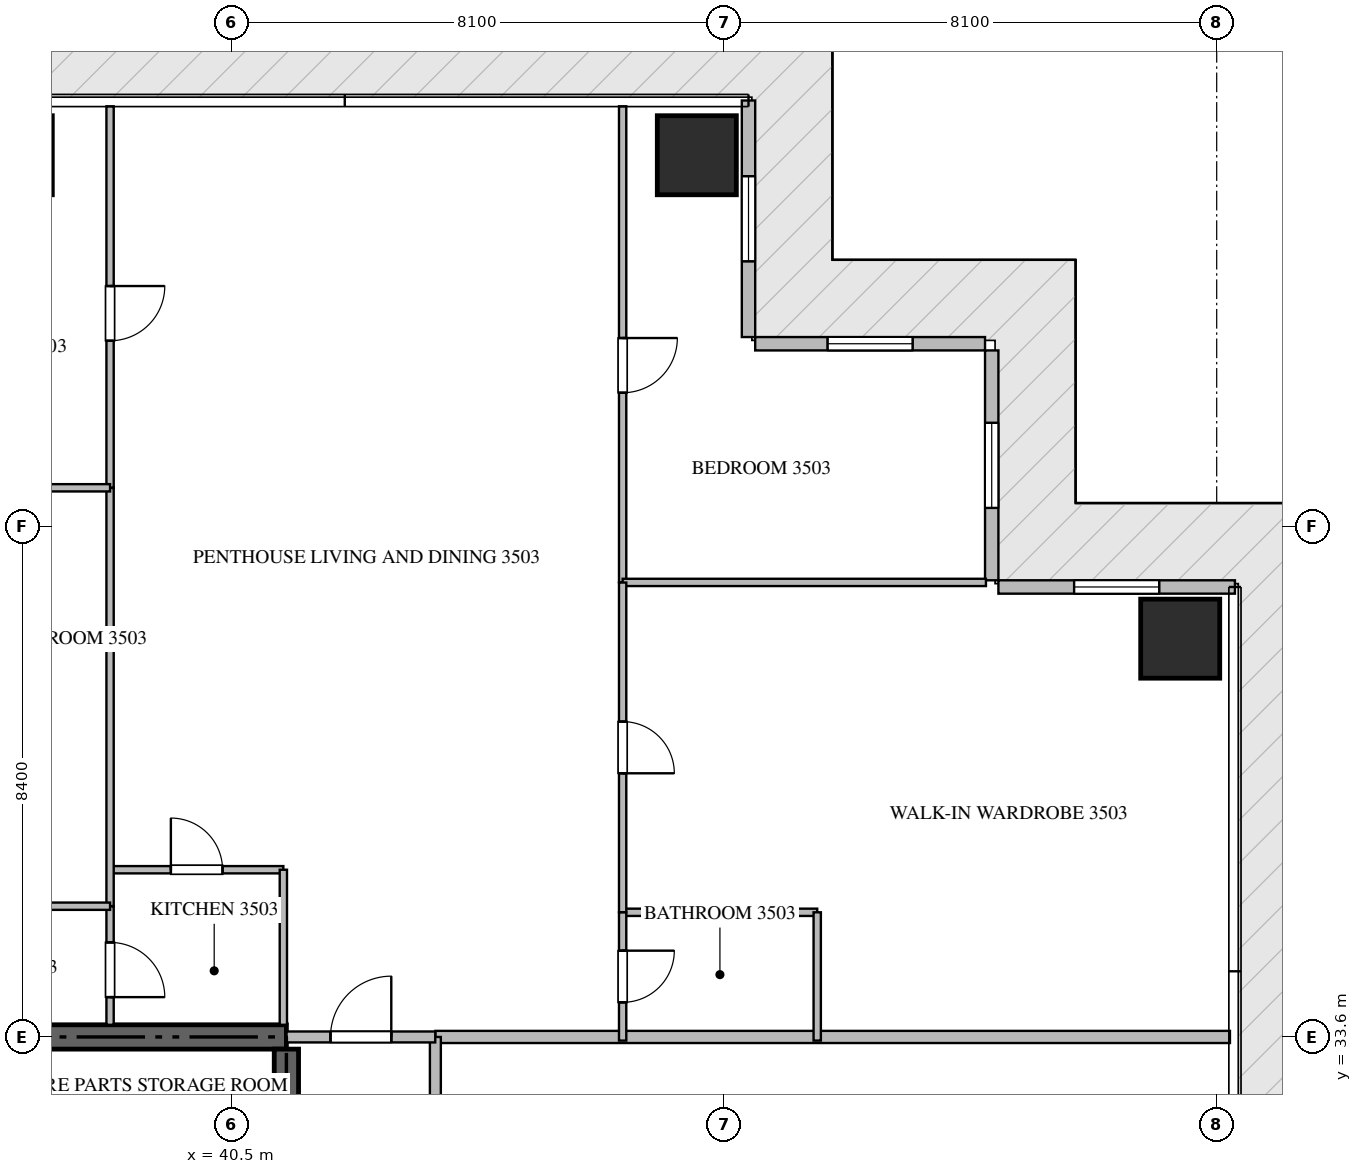
"""IFC4 building model, lengths in metres.
Left out: names, types, materials, properties, quantities, classifications, styles, units other than length and angle.
Written with IfcOpenShell. Run it as: python <this file> out.ifc"""

import sys

from ifc_helpers import new_model, si_unit, direction, frame, frame_2d, origin, origin_2d, place, context, subcontext, project, spatial, rectangle, extrude, source, transform, mapped, element, fill, save


model = new_model("IFC4")
c1 = context("Model", 3, precision=1e-05, world=origin(), true_north=direction((0.0, 1.0)))
c2 = subcontext(c1, "Body", "Model", "MODEL_VIEW")
j1 = project(units=[si_unit("LENGTHUNIT", "METRE"), si_unit("PLANEANGLEUNIT", "RADIAN")], contexts=[c1])
p1 = place(None, origin())
s1 = spatial("IfcSite", under=j1, at=p1, CompositionType="ELEMENT")
p2 = place(p1, origin())
s2 = spatial("IfcBuilding", under=s1, at=p2, CompositionType="ELEMENT")
p3 = place(p2, frame((0.0, 0.0, 142.65)))
s3 = spatial("IfcBuildingStorey", under=s2, at=p3, CompositionType="ELEMENT", Elevation=142.65)
p4 = place(p3, frame((41.4, 33.6, -0.26), z_axis=(0.0, 0.0, 1.0), x_axis=(-1.0, 0.0, 0.0)))
e1 = element("IfcWall", 1, at=p4, inside=s3, PredefinedType="SHEAR", context=c2, shape_type="SweptSolid", body=[
    extrude(rectangle(XDim=18.0, YDim=0.4, at=frame_2d((9.0, 0.0))), origin(), (0.0, 0.0, 1.0), 3.748),
])
p5 = place(p3, frame((41.4, 27.75, -0.26), z_axis=(0.0, 0.0, 1.0), x_axis=(0.0, 1.0, 0.0)))
e2 = element("IfcWall", 2, at=p5, inside=s3, PredefinedType="SHEAR", context=c2, shape_type="SweptSolid", body=[
    extrude(rectangle(XDim=5.65, YDim=0.4, at=frame_2d((2.825, 0.0))), origin(), (0.0, 0.0, 1.0), 3.748),
])
m1 = source(origin(), c2, "Body", "SweptSolid", [
    extrude(rectangle(XDim=1.3, YDim=1.3, at=origin_2d()), origin(), (0.0, 0.0, 1.0), 3.75),
])
for number, where, z_axis, x_axis in (
    (3, (48.15, 48.1, -0.26), (0.0, 0.0, 1.0), (1.0, 0.0, 0.0)),
    (4, (56.1, 40.15, -0.26), (0.0, 0.0, 1.0), (1.0, 0.0, 0.0)),
):
    element("IfcColumn", number, at=place(p3, frame(where, z_axis=z_axis, x_axis=x_axis)), inside=s3, PredefinedType="COLUMN", context=c2, shape_type="MappedRepresentation", body=[
        mapped(m1, transform((0.0, 0.0, 0.0), scale=1.0)),
    ])
p6 = place(p3, frame((57.0, 41.0, 0.0), z_axis=(0.0, 0.0, 1.0), x_axis=(-1.0, 0.0, 0.0)))
e5 = element("IfcWall", 5, at=p6, inside=s3, PredefinedType="ELEMENTEDWALL", context=c2, shape_type="SweptSolid", body=[
    extrude(rectangle(XDim=3.89, YDim=0.22, at=frame_2d((1.945, 0.0))), origin(), (0.0, 0.0, 1.0), 3.475),
])
p7 = place(p6, frame((1.245, 0.0, 0.65)))
e6 = element("IfcOpeningElement", 6, at=p7, cuts=e5, PredefinedType="OPENING", context=c2, shape_type="SweptSolid", body=[
    extrude(rectangle(XDim=1.4, YDim=2.05, at=frame_2d((0.7, 1.025))), frame((0.0, 0.12, 0.0), z_axis=(0.0, -1.0, 0.0), x_axis=(1.0, 0.0, 0.0)), (0.0, 0.0, 1.0), 0.24),
])
p8 = place(p3, frame((53.0, 41.11, 0.0), z_axis=(0.0, 0.0, 1.0), x_axis=(0.0, 1.0, 0.0)))
e7 = element("IfcWall", 7, at=p8, inside=s3, PredefinedType="ELEMENTEDWALL", context=c2, shape_type="SweptSolid", body=[
    extrude(rectangle(XDim=3.78, YDim=0.22, at=frame_2d((1.89, 0.0))), origin(), (0.0, 0.0, 1.0), 3.475),
])
p9 = place(p8, frame((1.19, 0.0, 0.65)))
e8 = element("IfcOpeningElement", 8, at=p9, cuts=e7, PredefinedType="OPENING", context=c2, shape_type="SweptSolid", body=[
    extrude(rectangle(XDim=1.4, YDim=2.05, at=frame_2d((0.7, 1.025))), frame((0.0, 0.12, 0.0), z_axis=(0.0, -1.0, 0.0), x_axis=(1.0, 0.0, 0.0)), (0.0, 0.0, 1.0), 0.24),
])
p10 = place(p3, frame((52.89, 45.0, 0.0), z_axis=(0.0, 0.0, 1.0), x_axis=(-1.0, 0.0, 0.0)))
e9 = element("IfcWall", 9, at=p10, inside=s3, PredefinedType="ELEMENTEDWALL", context=c2, shape_type="SweptSolid", body=[
    extrude(rectangle(XDim=3.78, YDim=0.22, at=frame_2d((1.89, 0.0))), origin(), (0.0, 0.0, 1.0), 3.475),
])
p11 = place(p10, frame((1.19, 0.0, 0.65)))
e10 = element("IfcOpeningElement", 10, at=p11, cuts=e9, PredefinedType="OPENING", context=c2, shape_type="SweptSolid", body=[
    extrude(rectangle(XDim=1.4, YDim=2.05, at=frame_2d((0.7, 1.025))), frame((0.0, 0.12, 0.0), z_axis=(0.0, -1.0, 0.0), x_axis=(1.0, 0.0, 0.0)), (0.0, 0.0, 1.0), 0.24),
])
p12 = place(p3, frame((49.0, 45.11, 0.0), z_axis=(0.0, 0.0, 1.0), x_axis=(0.0, 1.0, 0.0)))
e11 = element("IfcWall", 11, at=p12, inside=s3, PredefinedType="ELEMENTEDWALL", context=c2, shape_type="SweptSolid", body=[
    extrude(rectangle(XDim=3.89, YDim=0.22, at=frame_2d((1.945, 0.0))), origin(), (0.0, 0.0, 1.0), 3.475),
])
p13 = place(p12, frame((1.245, 0.0, 0.65)))
e12 = element("IfcOpeningElement", 12, at=p13, cuts=e11, PredefinedType="OPENING", context=c2, shape_type="SweptSolid", body=[
    extrude(rectangle(XDim=1.4, YDim=2.05, at=frame_2d((0.7, 1.025))), frame((0.0, 0.12, 0.0), z_axis=(0.0, -1.0, 0.0), x_axis=(1.0, 0.0, 0.0)), (0.0, 0.0, 1.0), 0.24),
])
p14 = place(p3, frame((43.85, 33.6, 0.0), z_axis=(0.0, 0.0, 1.0), x_axis=(1.0, 0.0, 0.0)))
e13 = element("IfcWall", 13, at=p14, inside=s3, PredefinedType="PARTITIONING", context=c2, shape_type="SweptSolid", body=[
    extrude(rectangle(XDim=13.068, YDim=0.2, at=frame_2d((6.534, 0.0))), origin(), (0.0, 0.0, 1.0), 3.49),
])
p15 = place(p3, frame((43.85, 14.9, 0.0), z_axis=(0.0, 0.0, 1.0), x_axis=(0.0, 1.0, 0.0)))
e14 = element("IfcWall", 14, at=p15, inside=s3, PredefinedType="PARTITIONING", context=c2, shape_type="SweptSolid", body=[
    extrude(rectangle(XDim=18.7, YDim=0.18, at=frame_2d((9.35, 0.0))), origin(), (0.0, 0.0, 1.0), 3.49),
])
p16 = place(p15, frame((1.805, 0.0, 0.0)))
e15 = element("IfcOpeningElement", 15, at=p16, cuts=e14, PredefinedType="OPENING", context=c2, shape_type="SweptSolid", body=[
    extrude(rectangle(XDim=1.0, YDim=2.15, at=frame_2d((0.5, 1.075))), frame((0.0, 0.1, 0.0), z_axis=(0.0, -1.0, 0.0), x_axis=(1.0, 0.0, 0.0)), (0.0, 0.0, 1.0), 0.2),
])
p17 = place(p15, frame((15.222, 0.0, 0.0)))
e16 = element("IfcOpeningElement", 16, at=p17, cuts=e14, PredefinedType="OPENING", context=c2, shape_type="SweptSolid", body=[
    extrude(rectangle(XDim=1.0, YDim=2.15, at=frame_2d((0.5, 1.075))), frame((0.0, 0.1, 0.0), z_axis=(0.0, -1.0, 0.0), x_axis=(1.0, 0.0, 0.0)), (0.0, 0.0, 1.0), 0.2),
])
p18 = place(p3, frame((41.402, 33.6, 0.0), z_axis=(0.0, 0.0, 1.0), x_axis=(1.0, 0.0, 0.0)))
e17 = element("IfcWall", 17, at=p18, inside=s3, PredefinedType="PARTITIONING", context=c2, shape_type="SweptSolid", body=[
    extrude(rectangle(XDim=2.446, YDim=0.18, at=frame_2d((1.223, 0.0))), origin(), (0.0, 0.0, 1.0), 3.49),
])
p19 = place(p18, frame((0.723, 0.0, 0.0)))
e18 = element("IfcOpeningElement", 18, at=p19, cuts=e17, PredefinedType="OPENING", context=c2, shape_type="SweptSolid", body=[
    extrude(rectangle(XDim=1.0, YDim=2.15, at=frame_2d((0.5, 1.075))), frame((0.0, 0.1, 0.0), z_axis=(0.0, -1.0, 0.0), x_axis=(1.0, 0.0, 0.0)), (0.0, 0.0, 1.0), 0.2),
])
p20 = place(p3, frame((38.5, 36.35, 0.0), z_axis=(0.0, 0.0, 1.0), x_axis=(1.0, 0.0, 0.0)))
e19 = element("IfcWall", 19, at=p20, inside=s3, PredefinedType="PARTITIONING", context=c2, shape_type="SweptSolid", body=[
    extrude(rectangle(XDim=2.85, YDim=0.12, at=frame_2d((1.425, 0.0))), origin(), (0.0, 0.0, 1.0), 3.49),
])
p21 = place(p20, frame((1.0, 0.0, 0.0)))
e20 = element("IfcOpeningElement", 20, at=p21, cuts=e19, PredefinedType="OPENING", context=c2, shape_type="SweptSolid", body=[
    extrude(rectangle(XDim=0.85, YDim=2.1, at=frame_2d((0.425, 1.05))), frame((0.0, 0.07, 0.0), z_axis=(0.0, -1.0, 0.0), x_axis=(1.0, 0.0, 0.0)), (0.0, 0.0, 1.0), 0.14),
])
p22 = place(p3, frame((41.35, 36.35, 0.0), z_axis=(0.0, 0.0, 1.0), x_axis=(0.0, -1.0, 0.0)))
e21 = element("IfcWall", 21, at=p22, inside=s3, PredefinedType="PARTITIONING", context=c2, shape_type="SweptSolid", body=[
    extrude(rectangle(XDim=2.55, YDim=0.12, at=frame_2d((1.275, 0.0))), origin(), (0.0, 0.0, 1.0), 3.49),
])
p23 = place(p3, frame((38.5, 35.75, 0.0), z_axis=(0.0, 0.0, 1.0), x_axis=(0.0, -1.0, 0.0)))
e22 = element("IfcWall", 22, at=p23, inside=s3, PredefinedType="PARTITIONING", context=c2, shape_type="SweptSolid", body=[
    extrude(rectangle(XDim=1.95, YDim=0.12, at=frame_2d((0.975, 0.0))), origin(), (0.0, 0.0, 1.0), 3.49),
])
p24 = place(p23, frame((0.595, 0.0, 0.0)))
e23 = element("IfcOpeningElement", 23, at=p24, cuts=e22, PredefinedType="OPENING", context=c2, shape_type="SweptSolid", body=[
    extrude(rectangle(XDim=0.9, YDim=2.1, at=frame_2d((0.45, 1.05))), frame((0.0, 0.07, 0.0), z_axis=(0.0, -1.0, 0.0), x_axis=(1.0, 0.0, 0.0)), (0.0, 0.0, 1.0), 0.14),
])
p25 = place(p3, frame((38.5, 48.905, 0.0), z_axis=(0.0, 0.0, 1.0), x_axis=(0.0, -1.0, 0.0)))
e24 = element("IfcWall", 24, at=p25, inside=s3, PredefinedType="PARTITIONING", context=c2, shape_type="SweptSolid", body=[
    extrude(rectangle(XDim=6.274, YDim=0.12, at=frame_2d((3.137, 0.0))), origin(), (0.0, 0.0, 1.0), 3.49),
])
p26 = place(p25, frame((2.956, 0.0, 0.0)))
e25 = element("IfcOpeningElement", 25, at=p26, cuts=e24, PredefinedType="OPENING", context=c2, shape_type="SweptSolid", body=[
    extrude(rectangle(XDim=0.9, YDim=2.1, at=frame_2d((0.45, 1.05))), frame((0.0, 0.07, 0.0), z_axis=(0.0, -1.0, 0.0), x_axis=(1.0, 0.0, 0.0)), (0.0, 0.0, 1.0), 0.14),
])
p27 = place(p3, frame((38.5, 42.629, 0.0), z_axis=(0.0, 0.0, 1.0), x_axis=(0.0, -1.0, 0.0)))
e26 = element("IfcWall", 26, at=p27, inside=s3, PredefinedType="PARTITIONING", context=c2, shape_type="SweptSolid", body=[
    extrude(rectangle(XDim=6.877, YDim=0.12, at=frame_2d((3.438, 0.0))), origin(), (0.0, 0.0, 1.0), 3.49),
])
p28 = place(p3, frame((33.35, 42.631, 0.0), z_axis=(0.0, 0.0, 1.0), x_axis=(1.0, 0.0, 0.0)))
e27 = element("IfcWall", 27, at=p28, inside=s3, PredefinedType="PARTITIONING", context=c2, shape_type="SweptSolid", body=[
    extrude(rectangle(XDim=5.15, YDim=0.12, at=frame_2d((2.575, 0.0))), origin(), (0.0, 0.0, 1.0), 3.49),
])
p29 = place(p3, frame((35.452, 35.75, 0.0), z_axis=(0.0, 0.0, 1.0), x_axis=(1.0, 0.0, 0.0)))
e28 = element("IfcWall", 28, at=p29, inside=s3, PredefinedType="PARTITIONING", context=c2, shape_type="SweptSolid", body=[
    extrude(rectangle(XDim=3.048, YDim=0.12, at=frame_2d((1.524, 0.0))), origin(), (0.0, 0.0, 1.0), 3.49),
])
p30 = place(p29, frame((1.099, 0.0, 0.0)))
e29 = element("IfcOpeningElement", 29, at=p30, cuts=e28, PredefinedType="OPENING", context=c2, shape_type="SweptSolid", body=[
    extrude(rectangle(XDim=0.85, YDim=2.1, at=frame_2d((0.425, 1.05))), frame((0.0, 0.07, 0.0), z_axis=(0.0, -1.0, 0.0), x_axis=(1.0, 0.0, 0.0)), (0.0, 0.0, 1.0), 0.14),
])
p31 = place(p3, frame((46.93, 48.905, 0.0), z_axis=(0.0, 0.0, 1.0), x_axis=(0.0, -1.0, 0.0)))
e30 = element("IfcWall", 30, at=p31, inside=s3, PredefinedType="PARTITIONING", context=c2, shape_type="SweptSolid", body=[
    extrude(rectangle(XDim=7.83, YDim=0.12, at=frame_2d((3.915, 0.0))), origin(), (0.0, 0.0, 1.0), 3.49),
])
p32 = place(p31, frame((3.811, 0.0, 0.0)))
e31 = element("IfcOpeningElement", 31, at=p32, cuts=e30, PredefinedType="OPENING", context=c2, shape_type="SweptSolid", body=[
    extrude(rectangle(XDim=0.9, YDim=2.1, at=frame_2d((0.45, 1.05))), frame((0.0, 0.07, 0.0), z_axis=(0.0, -1.0, 0.0), x_axis=(1.0, 0.0, 0.0)), (0.0, 0.0, 1.0), 0.14),
])
p33 = place(p3, frame((46.93, 41.075, 0.0), z_axis=(0.0, 0.0, 1.0), x_axis=(1.0, 0.0, 0.0)))
e32 = element("IfcWall", 32, at=p33, inside=s3, PredefinedType="PARTITIONING", context=c2, shape_type="SweptSolid", body=[
    extrude(rectangle(XDim=5.975, YDim=0.12, at=frame_2d((2.988, 0.0))), origin(), (0.0, 0.0, 1.0), 3.49),
])
p34 = place(p3, frame((46.93, 35.65, 0.0), z_axis=(0.0, 0.0, 1.0), x_axis=(1.0, 0.0, 0.0)))
e33 = element("IfcWall", 33, at=p34, inside=s3, PredefinedType="PARTITIONING", context=c2, shape_type="SweptSolid", body=[
    extrude(rectangle(XDim=3.2, YDim=0.12, at=frame_2d((1.6, 0.0))), origin(), (0.0, 0.0, 1.0), 3.49),
])
p35 = place(p3, frame((50.13, 35.65, 0.0), z_axis=(0.0, 0.0, 1.0), x_axis=(0.0, -1.0, 0.0)))
e34 = element("IfcWall", 34, at=p35, inside=s3, PredefinedType="PARTITIONING", context=c2, shape_type="SweptSolid", body=[
    extrude(rectangle(XDim=2.11, YDim=0.12, at=frame_2d((1.055, 0.0))), origin(), (0.0, 0.0, 1.0), 3.49),
])
p36 = place(p3, frame((46.93, 41.073, 0.0), z_axis=(0.0, 0.0, 1.0), x_axis=(0.0, -1.0, 0.0)))
e35 = element("IfcWall", 35, at=p36, inside=s3, PredefinedType="PARTITIONING", context=c2, shape_type="SweptSolid", body=[
    extrude(rectangle(XDim=5.423, YDim=0.12, at=frame_2d((2.711, 0.0))), origin(), (0.0, 0.0, 1.0), 3.49),
])
p37 = place(p36, frame((2.287, 0.0, 0.0)))
e36 = element("IfcOpeningElement", 36, at=p37, cuts=e35, PredefinedType="OPENING", context=c2, shape_type="SweptSolid", body=[
    extrude(rectangle(XDim=0.85, YDim=2.1, at=frame_2d((0.425, 1.05))), frame((0.0, 0.07, 0.0), z_axis=(0.0, -1.0, 0.0), x_axis=(1.0, 0.0, 0.0)), (0.0, 0.0, 1.0), 0.14),
])
p38 = place(p3, frame((46.93, 35.648, 0.0), z_axis=(0.0, 0.0, 1.0), x_axis=(0.0, -1.0, 0.0)))
e37 = element("IfcWall", 37, at=p38, inside=s3, PredefinedType="PARTITIONING", context=c2, shape_type="SweptSolid", body=[
    extrude(rectangle(XDim=2.108, YDim=0.12, at=frame_2d((1.054, 0.0))), origin(), (0.0, 0.0, 1.0), 3.49),
])
p39 = place(p38, frame((0.629, 0.0, 0.0)))
e38 = element("IfcOpeningElement", 38, at=p39, cuts=e37, PredefinedType="OPENING", context=c2, shape_type="SweptSolid", body=[
    extrude(rectangle(XDim=0.85, YDim=2.1, at=frame_2d((0.425, 1.05))), frame((0.0, 0.07, 0.0), z_axis=(0.0, -1.0, 0.0), x_axis=(1.0, 0.0, 0.0)), (0.0, 0.0, 1.0), 0.14),
])
m2 = source(origin(), c2, "Body", "SweptSolid", [
    extrude(rectangle(XDim=1.4, YDim=2.05, at=frame_2d((0.7, 1.025))), frame((0.0, 0.03, 0.0), z_axis=(0.0, -1.0, 0.0), x_axis=(1.0, 0.0, 0.0)), (0.0, 0.0, 1.0), 0.06),
])
p40 = place(p7, origin())
e39 = element("IfcWindow", 39, at=p40, inside=s3, PartitioningType="SINGLE_PANEL", PredefinedType="WINDOW", context=c2, shape_type="MappedRepresentation", body=[
    mapped(m2, transform((0.0, 0.0, 0.0), scale=1.0)),
])
fill(e6, e39)
p41 = place(p9, origin())
e40 = element("IfcWindow", 40, at=p41, inside=s3, PartitioningType="SINGLE_PANEL", PredefinedType="WINDOW", context=c2, shape_type="MappedRepresentation", body=[
    mapped(m2, transform((0.0, 0.0, 0.0), scale=1.0)),
])
fill(e8, e40)
p42 = place(p11, origin())
e41 = element("IfcWindow", 41, at=p42, inside=s3, PartitioningType="SINGLE_PANEL", PredefinedType="WINDOW", context=c2, shape_type="MappedRepresentation", body=[
    mapped(m2, transform((0.0, 0.0, 0.0), scale=1.0)),
])
fill(e10, e41)
p43 = place(p13, origin())
e42 = element("IfcWindow", 42, at=p43, inside=s3, PartitioningType="SINGLE_PANEL", PredefinedType="WINDOW", context=c2, shape_type="MappedRepresentation", body=[
    mapped(m2, transform((0.0, 0.0, 0.0), scale=1.0)),
])
fill(e12, e42)
m3 = source(origin(), c2, "Body", "SweptSolid", [
    extrude(rectangle(XDim=1.0, YDim=2.15, at=frame_2d((0.5, 1.075))), frame((0.0, 0.025, 0.0), z_axis=(0.0, -1.0, 0.0), x_axis=(1.0, 0.0, 0.0)), (0.0, 0.0, 1.0), 0.05),
])
p44 = place(p19, origin())
e43 = element("IfcDoor", 43, at=p44, inside=s3, OperationType="SINGLE_SWING_RIGHT", PredefinedType="DOOR", context=c2, shape_type="MappedRepresentation", body=[
    mapped(m3, transform((0.0, 0.0, 0.0), scale=1.0)),
])
fill(e18, e43)
m4 = source(origin(), c2, "Body", "SweptSolid", [
    extrude(rectangle(XDim=0.85, YDim=2.1, at=frame_2d((0.425, 1.05))), frame((0.0, 0.025, 0.0), z_axis=(0.0, -1.0, 0.0), x_axis=(1.0, 0.0, 0.0)), (0.0, 0.0, 1.0), 0.05),
])
p45 = place(p21, origin())
e44 = element("IfcDoor", 44, at=p45, inside=s3, OperationType="SINGLE_SWING_LEFT", PredefinedType="DOOR", context=c2, shape_type="MappedRepresentation", body=[
    mapped(m4, transform((0.0, 0.0, 0.0), scale=1.0)),
])
fill(e20, e44)
m5 = source(origin(), c2, "Body", "SweptSolid", [
    extrude(rectangle(XDim=0.9, YDim=2.1, at=frame_2d((0.45, 1.05))), frame((0.0, 0.025, 0.0), z_axis=(0.0, -1.0, 0.0), x_axis=(1.0, 0.0, 0.0)), (0.0, 0.0, 1.0), 0.05),
])
p46 = place(p24, origin())
e45 = element("IfcDoor", 45, at=p46, inside=s3, OperationType="SINGLE_SWING_RIGHT", PredefinedType="DOOR", context=c2, shape_type="MappedRepresentation", body=[
    mapped(m5, transform((0.0, 0.0, 0.0), scale=1.0)),
])
fill(e23, e45)
p47 = place(p26, origin())
e46 = element("IfcDoor", 46, at=p47, inside=s3, OperationType="SINGLE_SWING_LEFT", PredefinedType="DOOR", context=c2, shape_type="MappedRepresentation", body=[
    mapped(m5, transform((0.0, 0.0, 0.0), scale=1.0)),
])
fill(e25, e46)
p48 = place(p32, origin())
e47 = element("IfcDoor", 47, at=p48, inside=s3, OperationType="SINGLE_SWING_LEFT", PredefinedType="DOOR", context=c2, shape_type="MappedRepresentation", body=[
    mapped(m5, transform((0.0, 0.0, 0.0), scale=1.0)),
])
fill(e31, e47)
p49 = place(p37, origin())
e48 = element("IfcDoor", 48, at=p49, inside=s3, OperationType="SINGLE_SWING_RIGHT", PredefinedType="DOOR", context=c2, shape_type="MappedRepresentation", body=[
    mapped(m4, transform((0.0, 0.0, 0.0), scale=1.0)),
])
fill(e36, e48)
p50 = place(p39, origin())
e49 = element("IfcDoor", 49, at=p50, inside=s3, OperationType="SINGLE_SWING_LEFT", PredefinedType="DOOR", context=c2, shape_type="MappedRepresentation", body=[
    mapped(m4, transform((0.0, 0.0, 0.0), scale=1.0)),
])
fill(e38, e49)
save(model, sys.argv[1])
